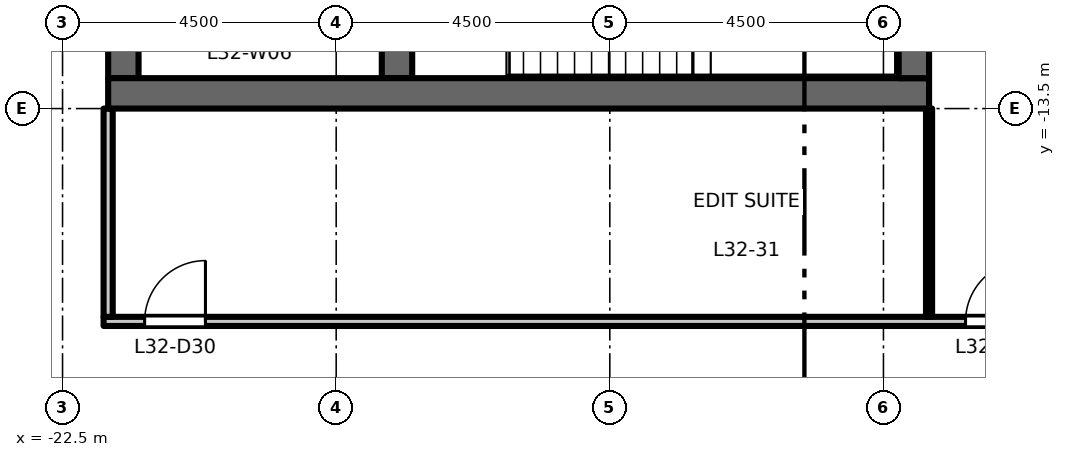
"""IFC4 building model, lengths in metres.
Left out: names, types, materials, properties, quantities, classifications, styles, units other than length and angle.
Written with IfcOpenShell. Run it as: python <this file> out.ifc"""

import sys

from ifc_helpers import new_model, si_unit, direction, frame, frame_2d, origin, place, context, subcontext, project, spatial, rectangle, extrude, element, fill, save


model = new_model("IFC4")
c1 = context("Model", 3, precision=1e-05, world=origin(), true_north=direction((0.0, 1.0)))
c2 = subcontext(c1, "Body", "Model", "MODEL_VIEW")
j1 = project(units=[si_unit("LENGTHUNIT", "METRE"), si_unit("PLANEANGLEUNIT", "RADIAN")], contexts=[c1])
p1 = place(None, origin())
s1 = spatial("IfcSite", under=j1, at=p1, CompositionType="ELEMENT")
p2 = place(p1, origin())
s2 = spatial("IfcBuilding", under=s1, at=p2, CompositionType="ELEMENT")
p3 = place(p2, frame((0.0, 0.0, 149.7)))
s3 = spatial("IfcBuildingStorey", under=s2, at=p3, CompositionType="ELEMENT", Elevation=149.7)
p4 = place(p3, frame((-21.5, -13.0, 0.0), z_axis=(0.0, 0.0, 1.0), x_axis=(0.0, 1.0, 0.0)))
e1 = element("IfcWall", 1, at=p4, inside=s3, PredefinedType="SHEAR", context=c2, shape_type="SweptSolid", body=[
    extrude(rectangle(XDim=26.0, YDim=0.5, at=frame_2d((13.0, 0.0))), origin(), (0.0, 0.0, 1.0), 4.35),
])
p5 = place(p4, frame((16.825, 0.0, 0.0)))
e2 = element("IfcOpeningElement", 2, at=p5, cuts=e1, PredefinedType="OPENING", context=c2, shape_type="SweptSolid", body=[
    extrude(rectangle(XDim=1.8, YDim=2.1, at=frame_2d((0.9, 1.05))), frame((0.0, 0.26, 0.0), z_axis=(0.0, -1.0, 0.0), x_axis=(1.0, 0.0, 0.0)), (0.0, 0.0, 1.0), 0.52),
])
p6 = place(p4, frame((7.375, 0.0, 0.0)))
e3 = element("IfcOpeningElement", 3, at=p6, cuts=e1, PredefinedType="OPENING", context=c2, shape_type="SweptSolid", body=[
    extrude(rectangle(XDim=1.8, YDim=2.1, at=frame_2d((0.9, 1.05))), frame((0.0, 0.26, 0.0), z_axis=(0.0, -1.0, 0.0), x_axis=(1.0, 0.0, 0.0)), (0.0, 0.0, 1.0), 0.52),
])
p7 = place(p4, frame((1.3, 0.0, 0.0)))
e4 = element("IfcOpeningElement", 4, at=p7, cuts=e1, PredefinedType="OPENING", context=c2, shape_type="SweptSolid", body=[
    extrude(rectangle(XDim=0.9, YDim=2.1, at=frame_2d((0.45, 1.05))), frame((0.0, 0.26, 0.0), z_axis=(0.0, -1.0, 0.0), x_axis=(1.0, 0.0, 0.0)), (0.0, 0.0, 1.0), 0.52),
])
p8 = place(p3, frame((-17.0, -13.0, 0.0), z_axis=(0.0, 0.0, 1.0), x_axis=(0.0, 1.0, 0.0)))
e5 = element("IfcWall", 5, at=p8, inside=s3, PredefinedType="SHEAR", context=c2, shape_type="SweptSolid", body=[
    extrude(rectangle(XDim=6.575, YDim=0.5, at=frame_2d((3.288, 0.0))), origin(), (0.0, 0.0, 1.0), 4.35),
])
p9 = place(p3, frame((-8.25, -13.25, 0.0), z_axis=(0.0, 0.0, 1.0), x_axis=(-1.0, 0.0, 0.0)))
e6 = element("IfcWall", 6, at=p9, inside=s3, PredefinedType="SHEAR", context=c2, shape_type="SweptSolid", body=[
    extrude(rectangle(XDim=13.5, YDim=0.5, at=frame_2d((6.75, 0.0))), origin(), (0.0, 0.0, 1.0), 4.35),
])
p10 = place(p3, frame((-8.5, -13.0, 0.0), z_axis=(0.0, 0.0, 1.0), x_axis=(0.0, 1.0, 0.0)))
e7 = element("IfcWall", 7, at=p10, inside=s3, PredefinedType="SHEAR", context=c2, shape_type="SweptSolid", body=[
    extrude(rectangle(XDim=26.0, YDim=0.5, at=frame_2d((13.0, 0.0))), origin(), (0.0, 0.0, 1.0), 4.35),
])
p11 = place(p3, frame((-21.825, -17.0, 0.0), z_axis=(0.0, 0.0, 1.0), x_axis=(1.0, 0.0, 0.0)))
e8 = element("IfcWall", 8, at=p11, inside=s3, PredefinedType="PARTITIONING", context=c2, shape_type="SweptSolid", body=[
    extrude(rectangle(XDim=43.65, YDim=0.15, at=frame_2d((21.825, 0.0))), origin(), (0.0, 0.0, 1.0), 4.35),
])
p12 = place(p11, frame((14.175, 0.0, 0.0)))
e9 = element("IfcOpeningElement", 9, at=p12, cuts=e8, PredefinedType="OPENING", context=c2, shape_type="SweptSolid", body=[
    extrude(rectangle(XDim=1.0, YDim=2.1, at=frame_2d((0.5, 1.05))), frame((0.0, 0.085, 0.0), z_axis=(0.0, -1.0, 0.0), x_axis=(1.0, 0.0, 0.0)), (0.0, 0.0, 1.0), 0.17),
])
p13 = place(p11, frame((28.425, 0.0, 0.0)))
e10 = element("IfcOpeningElement", 10, at=p13, cuts=e8, PredefinedType="OPENING", context=c2, shape_type="SweptSolid", body=[
    extrude(rectangle(XDim=1.0, YDim=2.1, at=frame_2d((0.5, 1.05))), frame((0.0, 0.085, 0.0), z_axis=(0.0, -1.0, 0.0), x_axis=(1.0, 0.0, 0.0)), (0.0, 0.0, 1.0), 0.17),
])
p14 = place(p11, frame((0.675, 0.0, 0.0)))
e11 = element("IfcOpeningElement", 11, at=p14, cuts=e8, PredefinedType="OPENING", context=c2, shape_type="SweptSolid", body=[
    extrude(rectangle(XDim=1.0, YDim=2.1, at=frame_2d((0.5, 1.05))), frame((0.0, 0.085, 0.0), z_axis=(0.0, -1.0, 0.0), x_axis=(1.0, 0.0, 0.0)), (0.0, 0.0, 1.0), 0.17),
])
p15 = place(p11, frame((41.925, 0.0, 0.0)))
e12 = element("IfcOpeningElement", 12, at=p15, cuts=e8, PredefinedType="OPENING", context=c2, shape_type="SweptSolid", body=[
    extrude(rectangle(XDim=1.0, YDim=2.1, at=frame_2d((0.5, 1.05))), frame((0.0, 0.085, 0.0), z_axis=(0.0, -1.0, 0.0), x_axis=(1.0, 0.0, 0.0)), (0.0, 0.0, 1.0), 0.17),
])
p16 = place(p3, frame((-21.75, -16.925, 0.0), z_axis=(0.0, 0.0, 1.0), x_axis=(0.0, 1.0, 0.0)))
e13 = element("IfcWall", 13, at=p16, inside=s3, PredefinedType="PARTITIONING", context=c2, shape_type="SweptSolid", body=[
    extrude(rectangle(XDim=3.425, YDim=0.15, at=frame_2d((1.712, 0.0))), origin(), (0.0, 0.0, 1.0), 4.35),
])
p17 = place(p3, frame((-8.25, -16.925, 0.0), z_axis=(0.0, 0.0, 1.0), x_axis=(0.0, 1.0, 0.0)))
e14 = element("IfcWall", 14, at=p17, inside=s3, PredefinedType="PARTITIONING", context=c2, shape_type="SweptSolid", body=[
    extrude(rectangle(XDim=3.425, YDim=0.1, at=frame_2d((1.712, 0.0))), origin(), (0.0, 0.0, 1.0), 4.35),
])
p18 = place(p12, origin())
e15 = element("IfcDoor", 15, at=p18, inside=s3, OperationType="SINGLE_SWING_RIGHT", PredefinedType="DOOR", context=c2, shape_type="SweptSolid", body=[
    extrude(rectangle(XDim=1.0, YDim=2.1, at=frame_2d((0.5, 1.05))), frame((0.0, 0.025, 0.0), z_axis=(0.0, -1.0, 0.0), x_axis=(1.0, 0.0, 0.0)), (0.0, 0.0, 1.0), 0.05),
])
fill(e9, e15)
p19 = place(p14, origin())
e16 = element("IfcDoor", 16, at=p19, inside=s3, OperationType="SINGLE_SWING_RIGHT", PredefinedType="DOOR", context=c2, shape_type="SweptSolid", body=[
    extrude(rectangle(XDim=1.0, YDim=2.1, at=frame_2d((0.5, 1.05))), frame((0.0, 0.025, 0.0), z_axis=(0.0, -1.0, 0.0), x_axis=(1.0, 0.0, 0.0)), (0.0, 0.0, 1.0), 0.05),
])
fill(e11, e16)
save(model, sys.argv[1])
